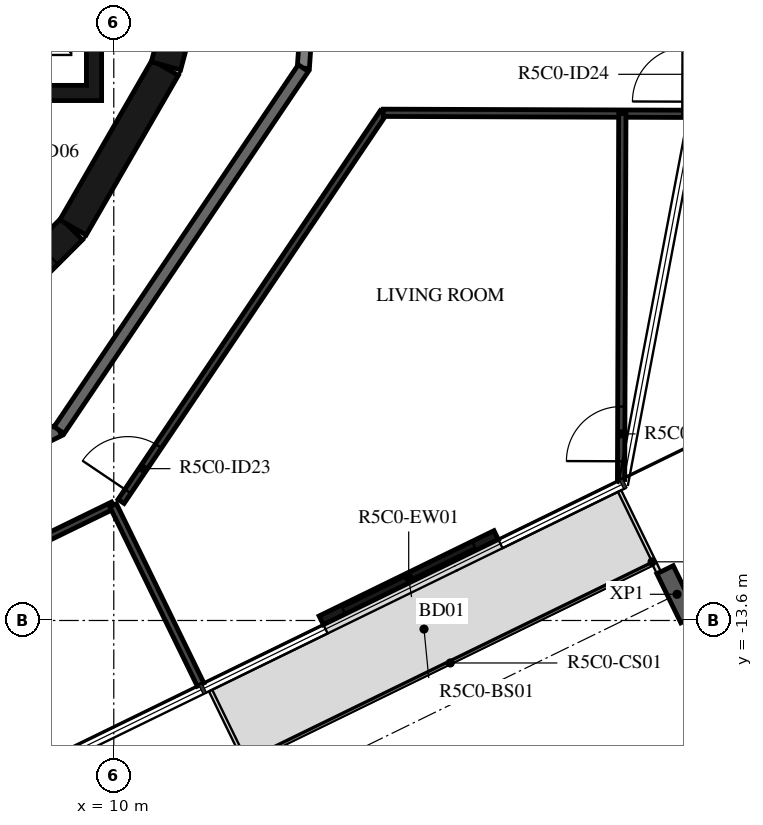
"""IFC4 building model, lengths in metres.
Left out: names, types, materials, properties, quantities, classifications, styles, units other than length and angle.
Written with IfcOpenShell. Run it as: python <this file> out.ifc"""

import sys

from ifc_helpers import new_model, si_unit, direction, frame, frame_2d, origin, origin_2d, place, context, subcontext, project, spatial, polyline, rectangle, i_section, outline, extrude, element, fill, save


model = new_model("IFC4")
c1 = context("Model", 3, precision=1e-05, world=origin(), true_north=direction((0.0, 1.0)))
c2 = subcontext(c1, "Body", "Model", "MODEL_VIEW")
j1 = project(units=[si_unit("LENGTHUNIT", "METRE"), si_unit("PLANEANGLEUNIT", "RADIAN")], contexts=[c1])
p1 = place(None, origin())
s1 = spatial("IfcSite", under=j1, at=p1, CompositionType="ELEMENT")
p2 = place(p1, origin())
s2 = spatial("IfcBuilding", under=s1, at=p2, CompositionType="ELEMENT")
p3 = place(p2, frame((0.0, 0.0, 209.4)))
s3 = spatial("IfcBuildingStorey", under=s2, at=p3, CompositionType="ELEMENT", Elevation=209.4)
p4 = place(p3, frame((19.263, -13.169, -0.38), z_axis=(0.0, 0.0, 1.0), x_axis=(-0.898794095235, -0.438371046456, 0.0)))
e1 = element("IfcColumn", 1, at=p4, inside=s3, PredefinedType="COLUMN", context=c2, shape_type="SweptSolid", body=[
    extrude(i_section(OverallWidth=0.3, OverallDepth=0.9, WebThickness=0.019, FlangeThickness=0.035, FilletRadius=0.03, at=origin_2d()), origin(), (0.0, 0.0, 1.0), 3.5),
])
p5 = place(p3, frame((13.412, -13.598, 0.0), z_axis=(0.0, 0.0, 1.0), x_axis=(0.898793373747, 0.438372525723, 0.0)))
e2 = element("IfcWall", 2, at=p5, inside=s3, PredefinedType="STANDARD", context=c2, shape_type="SweptSolid", body=[
    extrude(rectangle(XDim=3.2, YDim=0.16, at=frame_2d((1.6, 0.0))), origin(), (0.0, 0.0, 1.0), 3.12),
])
p6 = place(p5, frame((0.4, 0.0, 0.0)))
e3 = element("IfcOpeningElement", 3, at=p6, cuts=e2, PredefinedType="OPENING", context=c2, shape_type="SweptSolid", body=[
    extrude(rectangle(XDim=2.4, YDim=2.4, at=frame_2d((1.2, 1.2))), frame((0.0, 0.09, 0.0), z_axis=(0.0, -1.0, 0.0), x_axis=(1.0, 0.0, 0.0)), (0.0, 0.0, 1.0), 0.18),
])
p7 = place(p3, frame((7.164, -9.308, 0.0), z_axis=(0.0, 0.0, 1.0), x_axis=(0.707106781187, 0.707106781187, 0.0)))
e4 = element("IfcWall", 4, at=p7, inside=s3, PredefinedType="SHEAR", context=c2, shape_type="SweptSolid", body=[
    extrude(rectangle(XDim=3.032, YDim=0.5, at=frame_2d((1.516, 0.0))), origin(), (0.0, 0.0, 1.0), 3.12),
])
p8 = place(p7, frame((1.566, 0.0, 0.0)))
e5 = element("IfcOpeningElement", 5, at=p8, cuts=e4, PredefinedType="OPENING", context=c2, shape_type="SweptSolid", body=[
    extrude(rectangle(XDim=0.9, YDim=2.1, at=frame_2d((0.45, 1.05))), frame((0.0, 0.26, 0.0), z_axis=(0.0, -1.0, 0.0), x_axis=(1.0, 0.0, 0.0)), (0.0, 0.0, 1.0), 0.52),
])
for number, where, z_axis, x_axis in (
    (6, (9.329, -7.137, 0.0), (0.0, 0.0, 1.0), (0.5, 0.866, 0.0)),
    (7, (10.858, -4.479, 0.0), (0.0, 0.0, 1.0), (0.259, 0.966, 0.0)),
):
    element("IfcWall", number, at=place(p3, frame(where, z_axis=z_axis, x_axis=x_axis)), inside=s3, PredefinedType="SHEAR", context=c2, shape_type="SweptSolid", body=[
        extrude(rectangle(XDim=3.033, YDim=0.5, at=frame_2d((1.516, 0.0))), origin(), (0.0, 0.0, 1.0), 3.12),
    ])
p9 = place(p3, origin())
e8 = element("IfcWall", 8, at=p9, inside=s3, PredefinedType="SHEAR", context=c2, shape_type="SweptSolid", body=[
    extrude(outline(polyline([(9.8, -5.05), (9.8, -4.8), (9.8, -1.9), (9.55, -1.9), (9.55, -4.8), (7.65, -4.8), (7.65, -1.9), (7.4, -1.9), (7.4, -4.8), (5.5, -4.8), (5.5, -1.9), (5.25, -1.9), (5.25, -4.8), (3.35, -4.8), (3.35, -1.9), (3.1, -1.9), (3.1, -4.8), (1.2, -4.8), (1.2, -1.9), (0.95, -1.9), (0.95, -4.8), (-5.25, -4.8), (-5.25, -1.9), (-5.5, -1.9), (-5.5, -4.8), (-7.4, -4.8), (-7.4, -1.9), (-7.65, -1.9), (-7.65, -4.8), (-9.55, -4.8), (-9.55, -1.9), (-9.8, -1.9), (-9.8, -4.8), (-9.8, -5.05), (9.8, -5.05)])), origin(), (0.0, 0.0, 1.0), 3.12),
])
p10 = place(p3, frame((13.117, -4.517, 0.0), z_axis=(0.0, 0.0, 1.0), x_axis=(0.069736659613, 0.997565435601, 0.0)))
e9 = element("IfcWall", 9, at=p10, inside=s3, PredefinedType="STANDARD", context=c2, shape_type="SweptSolid", body=[
    extrude(rectangle(XDim=2.654, YDim=0.2, at=frame_2d((1.327, 0.0))), origin(), (0.0, 0.0, 1.0), 3.12),
])
p11 = place(p10, frame((1.134, 0.0, 0.0)))
e10 = element("IfcOpeningElement", 10, at=p11, cuts=e9, PredefinedType="OPENING", context=c2, shape_type="SweptSolid", body=[
    extrude(rectangle(XDim=1.2, YDim=2.1, at=frame_2d((0.6, 1.05))), frame((0.0, 0.11, 0.0), z_axis=(0.0, -1.0, 0.0), x_axis=(1.0, 0.0, 0.0)), (0.0, 0.0, 1.0), 0.22),
])
p12 = place(p3, frame((2.647, -13.618, 0.0), z_axis=(0.0, 0.0, 1.0), x_axis=(0.898796543751, 0.438366026218, 0.0)))
e11 = element("IfcWall", 11, at=p12, inside=s3, PredefinedType="STANDARD", context=c2, shape_type="SweptSolid", body=[
    extrude(rectangle(XDim=7.181, YDim=0.2, at=frame_2d((3.591, 0.0))), origin(), (0.0, 0.0, 1.0), 3.12),
])
p13 = place(p12, frame((0.2, 0.0, 0.0)))
e12 = element("IfcOpeningElement", 12, at=p13, cuts=e11, PredefinedType="OPENING", context=c2, shape_type="SweptSolid", body=[
    extrude(rectangle(XDim=1.0, YDim=2.1, at=frame_2d((0.5, 1.05))), frame((0.0, 0.11, 0.0), z_axis=(0.0, -1.0, 0.0), x_axis=(1.0, 0.0, 0.0)), (0.0, 0.0, 1.0), 0.22),
])
p14 = place(p3, frame((9.101, -10.47, 0.0), z_axis=(0.0, 0.0, 1.0), x_axis=(0.559195469534, 0.829035841718, 0.0)))
e13 = element("IfcWall", 13, at=p14, inside=s3, PredefinedType="STANDARD", context=c2, shape_type="SweptSolid", body=[
    extrude(rectangle(XDim=7.181, YDim=0.2, at=frame_2d((3.591, 0.0))), origin(), (0.0, 0.0, 1.0), 3.12),
])
p15 = place(p3, frame((3.074, -15.078, 0.0), z_axis=(0.0, 0.0, 1.0), x_axis=(0.898800770739, 0.438357359377, 0.0)))
e14 = element("IfcWall", 14, at=p15, inside=s3, PredefinedType="PARTITIONING", context=c2, shape_type="SweptSolid", body=[
    extrude(rectangle(XDim=7.694, YDim=0.12, at=frame_2d((3.847, 0.0))), origin(), (0.0, 0.0, 1.0), 3.12),
])
p16 = place(p15, frame((0.2, 0.0, 0.0)))
e15 = element("IfcOpeningElement", 15, at=p16, cuts=e14, PredefinedType="OPENING", context=c2, shape_type="SweptSolid", body=[
    extrude(rectangle(XDim=0.9, YDim=2.1, at=frame_2d((0.45, 1.05))), frame((0.0, 0.07, 0.0), z_axis=(0.0, -1.0, 0.0), x_axis=(1.0, 0.0, 0.0)), (0.0, 0.0, 1.0), 0.14),
])
p17 = place(p3, frame((10.12, -11.642, 0.0), z_axis=(0.0, 0.0, 1.0), x_axis=(0.559201404667, 0.829031838362, 0.0)))
e16 = element("IfcWall", 16, at=p17, inside=s3, PredefinedType="PARTITIONING", context=c2, shape_type="SweptSolid", body=[
    extrude(rectangle(XDim=7.709, YDim=0.12, at=frame_2d((3.854, 0.0))), origin(), (0.0, 0.0, 1.0), 3.12),
])
p18 = place(p17, frame((0.2, 0.0, 0.0)))
e17 = element("IfcOpeningElement", 17, at=p18, cuts=e16, PredefinedType="OPENING", context=c2, shape_type="SweptSolid", body=[
    extrude(rectangle(XDim=0.9, YDim=2.1, at=frame_2d((0.45, 1.05))), frame((0.0, 0.07, 0.0), z_axis=(0.0, -1.0, 0.0), x_axis=(1.0, 0.0, 0.0)), (0.0, 0.0, 1.0), 0.14),
])
p19 = place(p3, frame((14.431, -5.251, 0.0), z_axis=(0.0, 0.0, 1.0), x_axis=(0.999994153659, -0.003419451456, 0.0)))
e18 = element("IfcWall", 18, at=p19, inside=s3, PredefinedType="PARTITIONING", context=c2, shape_type="SweptSolid", body=[
    extrude(rectangle(XDim=4.998, YDim=0.12, at=frame_2d((2.499, 0.0))), origin(), (0.0, 0.0, 1.0), 3.12),
])
p20 = place(p3, frame((11.427, -14.654, 0.0), z_axis=(0.0, 0.0, 1.0), x_axis=(-0.438410435857, 0.898774882677, 0.0)))
e19 = element("IfcWall", 19, at=p20, inside=s3, PredefinedType="PARTITIONING", context=c2, shape_type="SweptSolid", body=[
    extrude(rectangle(XDim=3.281, YDim=0.12, at=frame_2d((1.64, 0.0))), origin(), (0.0, 0.0, 1.0), 2.73),
])
p21 = place(p3, frame((18.343, -11.282, 0.0), z_axis=(0.0, 0.0, 1.0), x_axis=(0.003448675073, 0.999994053302, 0.0)))
e20 = element("IfcWall", 20, at=p21, inside=s3, PredefinedType="PARTITIONING", context=c2, shape_type="SweptSolid", body=[
    extrude(rectangle(XDim=6.017, YDim=0.12, at=frame_2d((3.009, 0.0))), origin(), (0.0, 0.0, 1.0), 3.12),
])
p22 = place(p21, frame((0.3, 0.0, 0.0)))
e21 = element("IfcOpeningElement", 21, at=p22, cuts=e20, PredefinedType="OPENING", context=c2, shape_type="SweptSolid", body=[
    extrude(rectangle(XDim=0.9, YDim=2.1, at=frame_2d((0.45, 1.05))), frame((0.0, 0.07, 0.0), z_axis=(0.0, -1.0, 0.0), x_axis=(1.0, 0.0, 0.0)), (0.0, 0.0, 1.0), 0.14),
])
p23 = place(p6, origin())
e22 = element("IfcDoor", 22, at=p23, inside=s3, OperationType="DOUBLE_DOOR_SLIDING", PredefinedType="DOOR", context=c2, shape_type="SweptSolid", body=[
    extrude(rectangle(XDim=2.4, YDim=2.4, at=frame_2d((1.2, 1.2))), frame((0.0, 0.025, 0.0), z_axis=(0.0, -1.0, 0.0), x_axis=(1.0, 0.0, 0.0)), (0.0, 0.0, 1.0), 0.05),
])
fill(e3, e22)
p24 = place(p18, origin())
e23 = element("IfcDoor", 23, at=p24, inside=s3, OperationType="SINGLE_SWING_RIGHT", PredefinedType="DOOR", context=c2, shape_type="SweptSolid", body=[
    extrude(rectangle(XDim=0.9, YDim=2.1, at=frame_2d((0.45, 1.05))), frame((0.0, 0.025, 0.0), z_axis=(0.0, -1.0, 0.0), x_axis=(1.0, 0.0, 0.0)), (0.0, 0.0, 1.0), 0.05),
])
fill(e17, e23)
p25 = place(p22, origin())
e24 = element("IfcDoor", 24, at=p25, inside=s3, OperationType="SINGLE_SWING_RIGHT", PredefinedType="DOOR", context=c2, shape_type="SweptSolid", body=[
    extrude(rectangle(XDim=0.9, YDim=2.1, at=frame_2d((0.45, 1.05))), frame((0.0, 0.025, 0.0), z_axis=(0.0, -1.0, 0.0), x_axis=(1.0, 0.0, 0.0)), (0.0, 0.0, 1.0), 0.05),
])
fill(e21, e24)
save(model, sys.argv[1])
